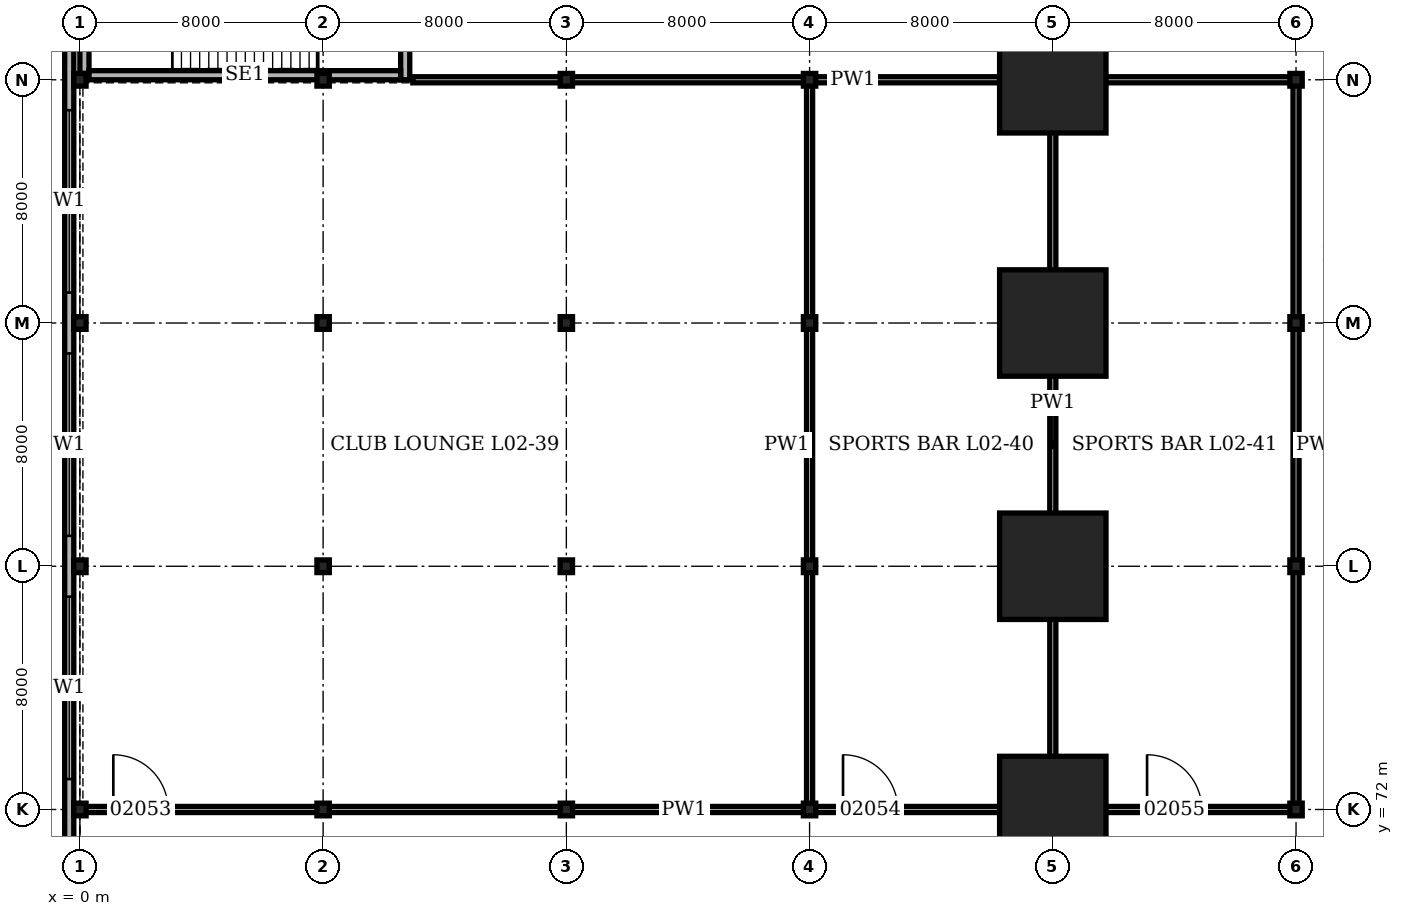
"""IFC4 building model, lengths in metres.
Left out: names, types, materials, properties, quantities, classifications, styles, units other than length and angle.
Written with IfcOpenShell. Run it as: python <this file> out.ifc"""

import sys

from ifc_helpers import new_model, si_unit, direction, frame, frame_2d, origin, origin_2d, place, context, subcontext, project, spatial, rectangle, hollow_rectangle, i_section, extrude, element, fill, save


model = new_model("IFC4")
c1 = context("Model", 3, precision=1e-05, world=origin(), true_north=direction((0.0, 1.0)))
c2 = subcontext(c1, "Body", "Model", "MODEL_VIEW")
j1 = project(units=[si_unit("LENGTHUNIT", "METRE"), si_unit("PLANEANGLEUNIT", "RADIAN")], contexts=[c1])
p1 = place(None, origin())
s1 = spatial("IfcSite", under=j1, at=p1, CompositionType="ELEMENT")
p2 = place(p1, origin())
s2 = spatial("IfcBuilding", under=s1, at=p2, CompositionType="ELEMENT")
p3 = place(p2, frame((0.0, 0.0, 9.9)))
s3 = spatial("IfcBuildingStorey", under=s2, at=p3, CompositionType="ELEMENT", Elevation=9.9)
for number, where, z_axis, x_axis in (
    (1, (0.0, 72.0, 0.0), (0.0, 0.0, 1.0), (1.0, 0.0, 0.0)),
    (2, (0.0, 80.0, 0.0), (0.0, 0.0, 1.0), (1.0, 0.0, 0.0)),
    (3, (0.0, 88.0, 0.0), (0.0, 0.0, 1.0), (1.0, 0.0, 0.0)),
    (4, (0.0, 96.0, 0.0), (0.0, 0.0, 1.0), (1.0, 0.0, 0.0)),
    (5, (8.0, 72.0, 0.0), (0.0, 0.0, 1.0), (1.0, 0.0, 0.0)),
    (6, (8.0, 80.0, 0.0), (0.0, 0.0, 1.0), (1.0, 0.0, 0.0)),
    (7, (8.0, 88.0, 0.0), (0.0, 0.0, 1.0), (1.0, 0.0, 0.0)),
    (8, (8.0, 96.0, 0.0), (0.0, 0.0, 1.0), (1.0, 0.0, 0.0)),
    (9, (16.0, 72.0, 0.0), (0.0, 0.0, 1.0), (1.0, 0.0, 0.0)),
    (10, (16.0, 80.0, 0.0), (0.0, 0.0, 1.0), (1.0, 0.0, 0.0)),
    (11, (16.0, 88.0, 0.0), (0.0, 0.0, 1.0), (1.0, 0.0, 0.0)),
    (12, (16.0, 96.0, 0.0), (0.0, 0.0, 1.0), (1.0, 0.0, 0.0)),
    (13, (24.0, 72.0, 0.0), (0.0, 0.0, 1.0), (1.0, 0.0, 0.0)),
    (14, (24.0, 80.0, 0.0), (0.0, 0.0, 1.0), (1.0, 0.0, 0.0)),
    (15, (24.0, 88.0, 0.0), (0.0, 0.0, 1.0), (1.0, 0.0, 0.0)),
    (16, (24.0, 96.0, 0.0), (0.0, 0.0, 1.0), (1.0, 0.0, 0.0)),
):
    element("IfcColumn", number, at=place(p3, frame(where, z_axis=z_axis, x_axis=x_axis)), inside=s3, PredefinedType="COLUMN", context=c2, shape_type="SweptSolid", body=[
        extrude(i_section(OverallWidth=0.406, OverallDepth=0.417, WebThickness=0.03, FlangeThickness=0.048, at=origin_2d()), origin(), (0.0, 0.0, 1.0), 5.0),
    ])
for number, where, z_axis, x_axis in (
    (17, (32.0, 72.0, 0.0), (0.0, 0.0, 1.0), (1.0, 0.0, 0.0)),
    (18, (32.0, 80.0, 0.0), (0.0, 0.0, 1.0), (1.0, 0.0, 0.0)),
    (19, (32.0, 88.0, 0.0), (0.0, 0.0, 1.0), (1.0, 0.0, 0.0)),
    (20, (32.0, 96.0, 0.0), (0.0, 0.0, 1.0), (1.0, 0.0, 0.0)),
):
    element("IfcColumn", number, at=place(p3, frame(where, z_axis=z_axis, x_axis=x_axis)), inside=s3, PredefinedType="COLUMN", context=c2, shape_type="SweptSolid", body=[
        extrude(hollow_rectangle(XDim=3.5, YDim=3.5, WallThickness=0.5, at=origin_2d()), origin(), (0.0, 0.0, 1.0), 5.0),
    ])
for number, where, z_axis, x_axis in (
    (21, (40.0, 72.0, 0.0), (0.0, 0.0, 1.0), (1.0, 0.0, 0.0)),
    (22, (40.0, 80.0, 0.0), (0.0, 0.0, 1.0), (1.0, 0.0, 0.0)),
    (23, (40.0, 88.0, 0.0), (0.0, 0.0, 1.0), (1.0, 0.0, 0.0)),
    (24, (40.0, 96.0, 0.0), (0.0, 0.0, 1.0), (1.0, 0.0, 0.0)),
):
    element("IfcColumn", number, at=place(p3, frame(where, z_axis=z_axis, x_axis=x_axis)), inside=s3, PredefinedType="COLUMN", context=c2, shape_type="SweptSolid", body=[
        extrude(i_section(OverallWidth=0.406, OverallDepth=0.417, WebThickness=0.03, FlangeThickness=0.048, at=origin_2d()), origin(), (0.0, 0.0, 1.0), 5.0),
    ])
p4 = place(p3, frame((-0.35, 112.35, 0.0), z_axis=(0.0, 0.0, 1.0), x_axis=(0.0, -1.0, 0.0)))
e25 = element("IfcWall", 25, at=p4, inside=s3, PredefinedType="SOLIDWALL", context=c2, shape_type="SweptSolid", body=[
    extrude(rectangle(XDim=112.7, YDim=0.3, at=frame_2d((56.35, 0.0))), origin(), (0.0, 0.0, 1.0), 5.0),
])
p5 = place(p4, frame((1.35, 0.0, 1.0)))
e26 = element("IfcOpeningElement", 26, at=p5, cuts=e25, PredefinedType="OPENING", context=c2, shape_type="SweptSolid", body=[
    extrude(rectangle(XDim=6.0, YDim=1.5, at=frame_2d((3.0, 0.75))), frame((0.0, 0.16, 0.0), z_axis=(0.0, -1.0, 0.0), x_axis=(1.0, 0.0, 0.0)), (0.0, 0.0, 1.0), 0.32),
])
p6 = place(p4, frame((9.35, 0.0, 1.0)))
e27 = element("IfcOpeningElement", 27, at=p6, cuts=e25, PredefinedType="OPENING", context=c2, shape_type="SweptSolid", body=[
    extrude(rectangle(XDim=6.0, YDim=1.5, at=frame_2d((3.0, 0.75))), frame((0.0, 0.16, 0.0), z_axis=(0.0, -1.0, 0.0), x_axis=(1.0, 0.0, 0.0)), (0.0, 0.0, 1.0), 0.32),
])
p7 = place(p4, frame((17.35, 0.0, 1.0)))
e28 = element("IfcOpeningElement", 28, at=p7, cuts=e25, PredefinedType="OPENING", context=c2, shape_type="SweptSolid", body=[
    extrude(rectangle(XDim=6.0, YDim=1.5, at=frame_2d((3.0, 0.75))), frame((0.0, 0.16, 0.0), z_axis=(0.0, -1.0, 0.0), x_axis=(1.0, 0.0, 0.0)), (0.0, 0.0, 1.0), 0.32),
])
p8 = place(p4, frame((25.35, 0.0, 1.0)))
e29 = element("IfcOpeningElement", 29, at=p8, cuts=e25, PredefinedType="OPENING", context=c2, shape_type="SweptSolid", body=[
    extrude(rectangle(XDim=6.0, YDim=1.5, at=frame_2d((3.0, 0.75))), frame((0.0, 0.16, 0.0), z_axis=(0.0, -1.0, 0.0), x_axis=(1.0, 0.0, 0.0)), (0.0, 0.0, 1.0), 0.32),
])
p9 = place(p4, frame((33.35, 0.0, 1.0)))
e30 = element("IfcOpeningElement", 30, at=p9, cuts=e25, PredefinedType="OPENING", context=c2, shape_type="SweptSolid", body=[
    extrude(rectangle(XDim=6.0, YDim=1.5, at=frame_2d((3.0, 0.75))), frame((0.0, 0.16, 0.0), z_axis=(0.0, -1.0, 0.0), x_axis=(1.0, 0.0, 0.0)), (0.0, 0.0, 1.0), 0.32),
])
p10 = place(p4, frame((41.35, 0.0, 1.0)))
e31 = element("IfcOpeningElement", 31, at=p10, cuts=e25, PredefinedType="OPENING", context=c2, shape_type="SweptSolid", body=[
    extrude(rectangle(XDim=6.0, YDim=1.5, at=frame_2d((3.0, 0.75))), frame((0.0, 0.16, 0.0), z_axis=(0.0, -1.0, 0.0), x_axis=(1.0, 0.0, 0.0)), (0.0, 0.0, 1.0), 0.32),
])
p11 = place(p4, frame((49.35, 0.0, 1.0)))
e32 = element("IfcOpeningElement", 32, at=p11, cuts=e25, PredefinedType="OPENING", context=c2, shape_type="SweptSolid", body=[
    extrude(rectangle(XDim=6.0, YDim=1.5, at=frame_2d((3.0, 0.75))), frame((0.0, 0.16, 0.0), z_axis=(0.0, -1.0, 0.0), x_axis=(1.0, 0.0, 0.0)), (0.0, 0.0, 1.0), 0.32),
])
p12 = place(p4, frame((57.35, 0.0, 1.0)))
e33 = element("IfcOpeningElement", 33, at=p12, cuts=e25, PredefinedType="OPENING", context=c2, shape_type="SweptSolid", body=[
    extrude(rectangle(XDim=6.0, YDim=1.5, at=frame_2d((3.0, 0.75))), frame((0.0, 0.16, 0.0), z_axis=(0.0, -1.0, 0.0), x_axis=(1.0, 0.0, 0.0)), (0.0, 0.0, 1.0), 0.32),
])
p13 = place(p4, frame((65.35, 0.0, 1.0)))
e34 = element("IfcOpeningElement", 34, at=p13, cuts=e25, PredefinedType="OPENING", context=c2, shape_type="SweptSolid", body=[
    extrude(rectangle(XDim=6.0, YDim=1.5, at=frame_2d((3.0, 0.75))), frame((0.0, 0.16, 0.0), z_axis=(0.0, -1.0, 0.0), x_axis=(1.0, 0.0, 0.0)), (0.0, 0.0, 1.0), 0.32),
])
p14 = place(p4, frame((73.35, 0.0, 1.0)))
e35 = element("IfcOpeningElement", 35, at=p14, cuts=e25, PredefinedType="OPENING", context=c2, shape_type="SweptSolid", body=[
    extrude(rectangle(XDim=6.0, YDim=1.5, at=frame_2d((3.0, 0.75))), frame((0.0, 0.16, 0.0), z_axis=(0.0, -1.0, 0.0), x_axis=(1.0, 0.0, 0.0)), (0.0, 0.0, 1.0), 0.32),
])
p15 = place(p4, frame((81.35, 0.0, 1.0)))
e36 = element("IfcOpeningElement", 36, at=p15, cuts=e25, PredefinedType="OPENING", context=c2, shape_type="SweptSolid", body=[
    extrude(rectangle(XDim=6.0, YDim=1.5, at=frame_2d((3.0, 0.75))), frame((0.0, 0.16, 0.0), z_axis=(0.0, -1.0, 0.0), x_axis=(1.0, 0.0, 0.0)), (0.0, 0.0, 1.0), 0.32),
])
p16 = place(p4, frame((89.35, 0.0, 1.0)))
e37 = element("IfcOpeningElement", 37, at=p16, cuts=e25, PredefinedType="OPENING", context=c2, shape_type="SweptSolid", body=[
    extrude(rectangle(XDim=6.0, YDim=1.5, at=frame_2d((3.0, 0.75))), frame((0.0, 0.16, 0.0), z_axis=(0.0, -1.0, 0.0), x_axis=(1.0, 0.0, 0.0)), (0.0, 0.0, 1.0), 0.32),
])
p17 = place(p4, frame((97.35, 0.0, 1.0)))
e38 = element("IfcOpeningElement", 38, at=p17, cuts=e25, PredefinedType="OPENING", context=c2, shape_type="SweptSolid", body=[
    extrude(rectangle(XDim=6.0, YDim=1.5, at=frame_2d((3.0, 0.75))), frame((0.0, 0.16, 0.0), z_axis=(0.0, -1.0, 0.0), x_axis=(1.0, 0.0, 0.0)), (0.0, 0.0, 1.0), 0.32),
])
p18 = place(p4, frame((105.35, 0.0, 1.0)))
e39 = element("IfcOpeningElement", 39, at=p18, cuts=e25, PredefinedType="OPENING", context=c2, shape_type="SweptSolid", body=[
    extrude(rectangle(XDim=6.0, YDim=1.5, at=frame_2d((3.0, 0.75))), frame((0.0, 0.16, 0.0), z_axis=(0.0, -1.0, 0.0), x_axis=(1.0, 0.0, 0.0)), (0.0, 0.0, 1.0), 0.32),
])
p19 = place(p3, frame((0.15, 96.208, 0.0), z_axis=(0.0, 0.0, 1.0), x_axis=(0.0, 1.0, 0.0)))
e40 = element("IfcWall", 40, at=p19, inside=s3, PredefinedType="SOLIDWALL", context=c2, shape_type="SweptSolid", body=[
    extrude(rectangle(XDim=7.583, YDim=0.3, at=frame_2d((3.792, 0.0))), origin(), (0.0, 0.0, 1.0), 4.8),
])
p20 = place(p3, frame((10.7, 96.0, 0.0), z_axis=(0.0, 0.0, 1.0), x_axis=(0.0, 1.0, 0.0)))
e41 = element("IfcWall", 41, at=p20, inside=s3, PredefinedType="SOLIDWALL", context=c2, shape_type="SweptSolid", body=[
    extrude(rectangle(XDim=8.0, YDim=0.3, at=frame_2d((4.0, 0.0))), origin(), (0.0, 0.0, 1.0), 4.8),
])
p21 = place(p20, frame((1.1, 0.0, 0.0)))
e42 = element("IfcOpeningElement", 42, at=p21, cuts=e41, PredefinedType="OPENING", context=c2, shape_type="SweptSolid", body=[
    extrude(rectangle(XDim=1.8, YDim=2.1, at=frame_2d((0.9, 1.05))), frame((0.0, 0.16, 0.0), z_axis=(0.0, -1.0, 0.0), x_axis=(1.0, 0.0, 0.0)), (0.0, 0.0, 1.0), 0.32),
])
p22 = place(p3, frame((0.3, 96.15, 0.0), z_axis=(0.0, 0.0, 1.0), x_axis=(1.0, 0.0, 0.0)))
e43 = element("IfcWall", 43, at=p22, inside=s3, PredefinedType="SOLIDWALL", context=c2, shape_type="SweptSolid", body=[
    extrude(rectangle(XDim=10.25, YDim=0.3, at=frame_2d((5.125, 0.0))), origin(), (0.0, 0.0, 1.0), 4.8),
])
p23 = place(p3, frame((-0.15, 72.0, 0.0), z_axis=(0.0, 0.0, 1.0), x_axis=(1.0, 0.0, 0.0)))
e44 = element("IfcWall", 44, at=p23, inside=s3, PredefinedType="PARTITIONING", context=c2, shape_type="SweptSolid", body=[
    extrude(rectangle(XDim=40.05, YDim=0.2, at=frame_2d((20.025, 0.0))), origin(), (0.0, 0.0, 1.0), 4.028),
])
p24 = place(p23, frame((1.25, 0.0, 0.0)))
e45 = element("IfcOpeningElement", 45, at=p24, cuts=e44, PredefinedType="OPENING", context=c2, shape_type="SweptSolid", body=[
    extrude(rectangle(XDim=1.8, YDim=2.4, at=frame_2d((0.9, 1.2))), frame((0.0, 0.11, 0.0), z_axis=(0.0, -1.0, 0.0), x_axis=(1.0, 0.0, 0.0)), (0.0, 0.0, 1.0), 0.22),
])
p25 = place(p23, frame((25.25, 0.0, 0.0)))
e46 = element("IfcOpeningElement", 46, at=p25, cuts=e44, PredefinedType="OPENING", context=c2, shape_type="SweptSolid", body=[
    extrude(rectangle(XDim=1.8, YDim=2.4, at=frame_2d((0.9, 1.2))), frame((0.0, 0.11, 0.0), z_axis=(0.0, -1.0, 0.0), x_axis=(1.0, 0.0, 0.0)), (0.0, 0.0, 1.0), 0.22),
])
p26 = place(p23, frame((35.25, 0.0, 0.0)))
e47 = element("IfcOpeningElement", 47, at=p26, cuts=e44, PredefinedType="OPENING", context=c2, shape_type="SweptSolid", body=[
    extrude(rectangle(XDim=1.8, YDim=2.4, at=frame_2d((0.9, 1.2))), frame((0.0, 0.11, 0.0), z_axis=(0.0, -1.0, 0.0), x_axis=(1.0, 0.0, 0.0)), (0.0, 0.0, 1.0), 0.22),
])
p27 = place(p3, frame((10.95, 96.0, 0.0), z_axis=(0.0, 0.0, 1.0), x_axis=(1.0, 0.0, 0.0)))
e48 = element("IfcWall", 48, at=p27, inside=s3, PredefinedType="PARTITIONING", context=c2, shape_type="SweptSolid", body=[
    extrude(rectangle(XDim=28.95, YDim=0.2, at=frame_2d((14.475, 0.0))), origin(), (0.0, 0.0, 1.0), 4.028),
])
for number, where, z_axis, x_axis in (
    (49, (24.0, 72.1, 0.0), (0.0, 0.0, 1.0), (0.0, 1.0, 0.0)),
    (50, (32.0, 72.1, 0.0), (0.0, 0.0, 1.0), (0.0, 1.0, 0.0)),
    (51, (40.0, 72.1, 0.0), (0.0, 0.0, 1.0), (0.0, 1.0, 0.0)),
):
    element("IfcWall", number, at=place(p3, frame(where, z_axis=z_axis, x_axis=x_axis)), inside=s3, PredefinedType="PARTITIONING", context=c2, shape_type="SweptSolid", body=[
        extrude(rectangle(XDim=23.8, YDim=0.2, at=frame_2d((11.9, 0.0))), origin(), (0.0, 0.0, 1.0), 4.028),
    ])
p28 = place(p7, origin())
e52 = element("IfcWindow", 52, at=p28, inside=s3, PartitioningType="SINGLE_PANEL", PredefinedType="WINDOW", context=c2, shape_type="SweptSolid", body=[
    extrude(rectangle(XDim=6.0, YDim=1.5, at=frame_2d((3.0, 0.75))), frame((0.0, 0.03, 0.0), z_axis=(0.0, -1.0, 0.0), x_axis=(1.0, 0.0, 0.0)), (0.0, 0.0, 1.0), 0.06),
])
fill(e28, e52)
p29 = place(p8, origin())
e53 = element("IfcWindow", 53, at=p29, inside=s3, PartitioningType="SINGLE_PANEL", PredefinedType="WINDOW", context=c2, shape_type="SweptSolid", body=[
    extrude(rectangle(XDim=6.0, YDim=1.5, at=frame_2d((3.0, 0.75))), frame((0.0, 0.03, 0.0), z_axis=(0.0, -1.0, 0.0), x_axis=(1.0, 0.0, 0.0)), (0.0, 0.0, 1.0), 0.06),
])
fill(e29, e53)
p30 = place(p9, origin())
e54 = element("IfcWindow", 54, at=p30, inside=s3, PartitioningType="SINGLE_PANEL", PredefinedType="WINDOW", context=c2, shape_type="SweptSolid", body=[
    extrude(rectangle(XDim=6.0, YDim=1.5, at=frame_2d((3.0, 0.75))), frame((0.0, 0.03, 0.0), z_axis=(0.0, -1.0, 0.0), x_axis=(1.0, 0.0, 0.0)), (0.0, 0.0, 1.0), 0.06),
])
fill(e30, e54)
p31 = place(p24, origin())
e55 = element("IfcDoor", 55, at=p31, inside=s3, OperationType="DOUBLE_DOOR_DOUBLE_SWING", PredefinedType="DOOR", context=c2, shape_type="SweptSolid", body=[
    extrude(rectangle(XDim=1.8, YDim=2.4, at=frame_2d((0.9, 1.2))), frame((0.0, 0.1, 0.0), z_axis=(0.0, -1.0, 0.0), x_axis=(1.0, 0.0, 0.0)), (0.0, 0.0, 1.0), 0.199),
])
fill(e45, e55)
p32 = place(p25, origin())
e56 = element("IfcDoor", 56, at=p32, inside=s3, OperationType="DOUBLE_DOOR_DOUBLE_SWING", PredefinedType="DOOR", context=c2, shape_type="SweptSolid", body=[
    extrude(rectangle(XDim=1.8, YDim=2.4, at=frame_2d((0.9, 1.2))), frame((0.0, 0.1, 0.0), z_axis=(0.0, -1.0, 0.0), x_axis=(1.0, 0.0, 0.0)), (0.0, 0.0, 1.0), 0.199),
])
fill(e46, e56)
p33 = place(p26, origin())
e57 = element("IfcDoor", 57, at=p33, inside=s3, OperationType="DOUBLE_DOOR_DOUBLE_SWING", PredefinedType="DOOR", context=c2, shape_type="SweptSolid", body=[
    extrude(rectangle(XDim=1.8, YDim=2.4, at=frame_2d((0.9, 1.2))), frame((0.0, 0.1, 0.0), z_axis=(0.0, -1.0, 0.0), x_axis=(1.0, 0.0, 0.0)), (0.0, 0.0, 1.0), 0.199),
])
fill(e47, e57)
save(model, sys.argv[1])
